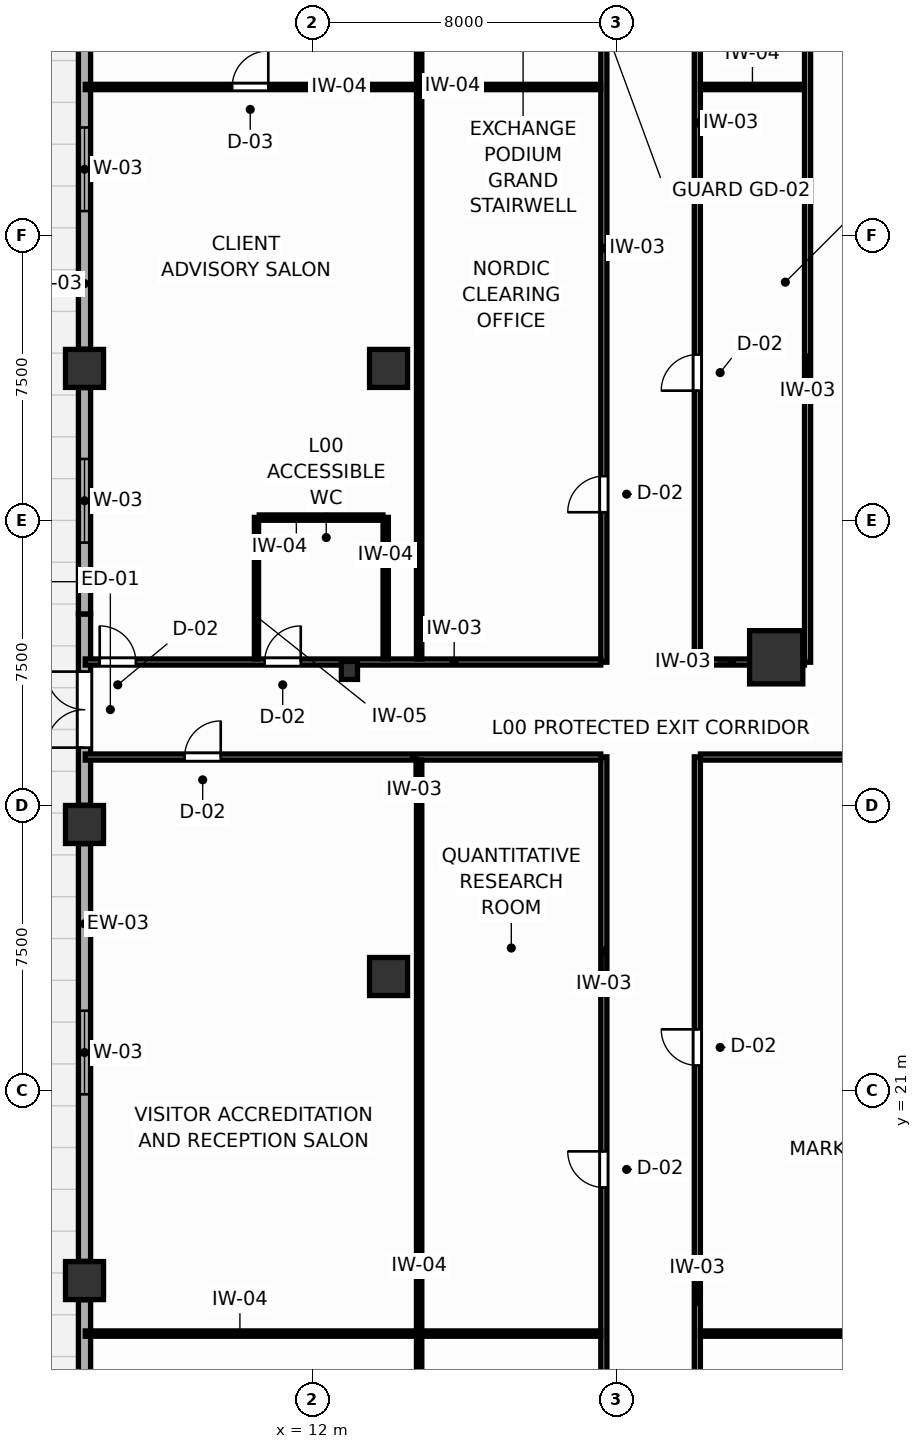
"""IFC4 building model, lengths in metres.
Left out: names, types, materials, properties, quantities, classifications, styles, units other than length and angle.
Written with IfcOpenShell. Run it as: python <this file> out.ifc"""

import sys

from ifc_helpers import new_model, si_unit, direction, frame, frame_2d, origin, origin_2d, place, context, subcontext, project, spatial, rectangle, i_section, extrude, source, transform, mapped, element, fill, save


model = new_model("IFC4")
c1 = context("Model", 3, precision=1e-05, world=origin(), true_north=direction((0.0, 1.0)))
c2 = subcontext(c1, "Body", "Model", "MODEL_VIEW")
j1 = project(units=[si_unit("LENGTHUNIT", "METRE"), si_unit("PLANEANGLEUNIT", "RADIAN")], contexts=[c1])
p1 = place(None, origin())
s1 = spatial("IfcSite", under=j1, at=p1, CompositionType="ELEMENT")
p2 = place(p1, origin())
s2 = spatial("IfcBuilding", under=s1, at=p2, CompositionType="ELEMENT")
p3 = place(p2, origin())
s3 = spatial("IfcBuildingStorey", under=s2, at=p3, CompositionType="ELEMENT", Elevation=0.0)
m1 = source(origin(), c2, "Body", "SweptSolid", [
    extrude(rectangle(XDim=1.4, YDim=1.4, at=origin_2d()), origin(), (0.0, 0.0, 1.0), 4.8),
])
p4 = place(p3, frame((24.2, 32.4, 0.0), z_axis=(0.0, 0.0, 1.0), x_axis=(1.0, 0.0, 0.0)))
e1 = element("IfcColumn", 1, at=p4, inside=s3, PredefinedType="COLUMN", context=c2, shape_type="MappedRepresentation", body=[
    mapped(m1, transform((0.0, 0.0, 0.0), scale=1.0)),
])
m2 = source(origin(), c2, "Body", "SweptSolid", [
    extrude(rectangle(XDim=1.0, YDim=1.0, at=origin_2d()), origin(), (0.0, 0.0, 1.0), 4.8),
])
for number, where, z_axis, x_axis in (
    (2, (6.0, 16.0, 0.0), (0.0, 0.0, 1.0), (1.0, 0.0, 0.0)),
    (3, (6.0, 28.0, 0.0), (0.0, 0.0, 1.0), (1.0, 0.0, 0.0)),
    (4, (6.0, 40.0, 0.0), (0.0, 0.0, 1.0), (1.0, 0.0, 0.0)),
    (5, (14.0, 24.0, 0.0), (0.0, 0.0, 1.0), (1.0, 0.0, 0.0)),
    (6, (14.0, 40.0, 0.0), (0.0, 0.0, 1.0), (1.0, 0.0, 0.0)),
):
    element("IfcColumn", number, at=place(p3, frame(where, z_axis=z_axis, x_axis=x_axis)), inside=s3, PredefinedType="COLUMN", context=c2, shape_type="MappedRepresentation", body=[
        mapped(m2, transform((0.0, 0.0, 0.0), scale=1.0)),
    ])
m3 = source(origin(), c2, "Body", "SweptSolid", [
    extrude(i_section(OverallWidth=0.424, OverallDepth=0.474, WebThickness=0.045, FlangeThickness=0.072, FilletRadius=0.015, at=origin_2d()), origin(), (0.0, 0.0, 1.0), 4.8),
])
p5 = place(p3, frame((12.97, 32.054, 0.0), z_axis=(0.0, 0.0, 1.0), x_axis=(1.0, 0.0, 0.0)))
e7 = element("IfcColumn", 7, at=p5, inside=s3, PredefinedType="COLUMN", context=c2, shape_type="MappedRepresentation", body=[
    mapped(m3, transform((0.0, 0.0, 0.0), scale=1.0)),
])
p6 = place(p3, frame((6.0, 4.505, 0.0), z_axis=(0.0, 0.0, 1.0), x_axis=(0.0, 1.0, 0.0)))
e8 = element("IfcWall", 8, at=p6, inside=s3, PredefinedType="SOLIDWALL", context=c2, shape_type="SweptSolid", body=[
    extrude(rectangle(XDim=10.99, YDim=0.32, at=frame_2d((5.495, 0.0))), origin(), (0.0, 0.0, 1.0), 3.82),
])
p7 = place(p6, frame((4.395, 0.0, 0.75)))
e9 = element("IfcOpeningElement", 9, at=p7, cuts=e8, PredefinedType="OPENING", context=c2, shape_type="SweptSolid", body=[
    extrude(rectangle(XDim=2.2, YDim=2.0, at=frame_2d((1.1, 1.0))), frame((0.0, 0.17, 0.0), z_axis=(0.0, -1.0, 0.0), x_axis=(1.0, 0.0, 0.0)), (0.0, 0.0, 1.0), 0.34),
])
p8 = place(p3, frame((6.0, 16.505, 0.0), z_axis=(0.0, 0.0, 1.0), x_axis=(0.0, 1.0, 0.0)))
e10 = element("IfcWall", 10, at=p8, inside=s3, PredefinedType="SOLIDWALL", context=c2, shape_type="SweptSolid", body=[
    extrude(rectangle(XDim=10.99, YDim=0.32, at=frame_2d((5.495, 0.0))), origin(), (0.0, 0.0, 1.0), 3.82),
])
p9 = place(p8, frame((4.395, 0.0, 0.75)))
e11 = element("IfcOpeningElement", 11, at=p9, cuts=e10, PredefinedType="OPENING", context=c2, shape_type="SweptSolid", body=[
    extrude(rectangle(XDim=2.2, YDim=2.0, at=frame_2d((1.1, 1.0))), frame((0.0, 0.17, 0.0), z_axis=(0.0, -1.0, 0.0), x_axis=(1.0, 0.0, 0.0)), (0.0, 0.0, 1.0), 0.34),
])
p10 = place(p3, frame((6.0, 28.505, 0.0), z_axis=(0.0, 0.0, 1.0), x_axis=(0.0, 1.0, 0.0)))
e12 = element("IfcWall", 12, at=p10, inside=s3, PredefinedType="SOLIDWALL", context=c2, shape_type="SweptSolid", body=[
    extrude(rectangle(XDim=5.035, YDim=0.32, at=frame_2d((2.518, 0.0))), origin(), (0.0, 0.0, 1.0), 3.82),
])
p11 = place(p10, frame((1.518, 0.0, 0.0)))
e13 = element("IfcOpeningElement", 13, at=p11, cuts=e12, PredefinedType="OPENING", context=c2, shape_type="SweptSolid", body=[
    extrude(rectangle(XDim=2.0, YDim=2.25, at=frame_2d((1.0, 1.125))), frame((0.0, 0.17, 0.0), z_axis=(0.0, -1.0, 0.0), x_axis=(1.0, 0.0, 0.0)), (0.0, 0.0, 1.0), 0.34),
])
p12 = place(p3, frame((6.0, 33.54, 0.0), z_axis=(0.0, 0.0, 1.0), x_axis=(0.0, 1.0, 0.0)))
e14 = element("IfcWall", 14, at=p12, inside=s3, PredefinedType="SOLIDWALL", context=c2, shape_type="SweptSolid", body=[
    extrude(rectangle(XDim=5.955, YDim=0.32, at=frame_2d((2.978, 0.0))), origin(), (0.0, 0.0, 1.0), 3.82),
])
p13 = place(p12, frame((1.877, 0.0, 0.75)))
e15 = element("IfcOpeningElement", 15, at=p13, cuts=e14, PredefinedType="OPENING", context=c2, shape_type="SweptSolid", body=[
    extrude(rectangle(XDim=2.2, YDim=2.0, at=frame_2d((1.1, 1.0))), frame((0.0, 0.17, 0.0), z_axis=(0.0, -1.0, 0.0), x_axis=(1.0, 0.0, 0.0)), (0.0, 0.0, 1.0), 0.34),
])
p14 = place(p3, frame((6.0, 40.505, 0.0), z_axis=(0.0, 0.0, 1.0), x_axis=(0.0, 1.0, 0.0)))
e16 = element("IfcWall", 16, at=p14, inside=s3, PredefinedType="SOLIDWALL", context=c2, shape_type="SweptSolid", body=[
    extrude(rectangle(XDim=9.47, YDim=0.32, at=frame_2d((4.735, 0.0))), origin(), (0.0, 0.0, 1.0), 3.82),
])
p15 = place(p14, frame((3.635, 0.0, 0.75)))
e17 = element("IfcOpeningElement", 17, at=p15, cuts=e16, PredefinedType="OPENING", context=c2, shape_type="SweptSolid", body=[
    extrude(rectangle(XDim=2.2, YDim=2.0, at=frame_2d((1.1, 1.0))), frame((0.0, 0.17, 0.0), z_axis=(0.0, -1.0, 0.0), x_axis=(1.0, 0.0, 0.0)), (0.0, 0.0, 1.0), 0.34),
])
p16 = place(p3, frame((22.125, 3.02, 0.0), z_axis=(0.0, 0.0, 1.0), x_axis=(0.0, 1.0, 0.0)))
e18 = element("IfcWall", 18, at=p16, inside=s3, PredefinedType="PARTITIONING", context=c2, shape_type="SweptSolid", body=[
    extrude(rectangle(XDim=26.76, YDim=0.16, at=frame_2d((13.38, 0.0))), origin(), (0.0, 0.0, 1.0), 4.52),
])
p17 = place(p16, frame((5.263, 0.0, 0.0)))
e19 = element("IfcOpeningElement", 19, at=p17, cuts=e18, PredefinedType="OPENING", context=c2, shape_type="SweptSolid", body=[
    extrude(rectangle(XDim=0.95, YDim=2.05, at=frame_2d((0.475, 1.025))), frame((0.0, 0.09, 0.0), z_axis=(0.0, -1.0, 0.0), x_axis=(1.0, 0.0, 0.0)), (0.0, 0.0, 1.0), 0.18),
])
p18 = place(p16, frame((18.64, 0.0, 0.0)))
e20 = element("IfcOpeningElement", 20, at=p18, cuts=e18, PredefinedType="OPENING", context=c2, shape_type="SweptSolid", body=[
    extrude(rectangle(XDim=0.95, YDim=2.05, at=frame_2d((0.475, 1.025))), frame((0.0, 0.09, 0.0), z_axis=(0.0, -1.0, 0.0), x_axis=(1.0, 0.0, 0.0)), (0.0, 0.0, 1.0), 0.18),
])
p19 = place(p3, frame((19.665, 3.02, 0.0), z_axis=(0.0, 0.0, 1.0), x_axis=(0.0, 1.0, 0.0)))
e21 = element("IfcWall", 21, at=p19, inside=s3, PredefinedType="PARTITIONING", context=c2, shape_type="SweptSolid", body=[
    extrude(rectangle(XDim=26.76, YDim=0.16, at=frame_2d((13.38, 0.0))), origin(), (0.0, 0.0, 1.0), 4.52),
])
p20 = place(p19, frame((8.486, 0.0, 0.0)))
e22 = element("IfcOpeningElement", 22, at=p20, cuts=e21, PredefinedType="OPENING", context=c2, shape_type="SweptSolid", body=[
    extrude(rectangle(XDim=0.95, YDim=2.05, at=frame_2d((0.475, 1.025))), frame((0.0, 0.09, 0.0), z_axis=(0.0, -1.0, 0.0), x_axis=(1.0, 0.0, 0.0)), (0.0, 0.0, 1.0), 0.18),
])
p21 = place(p19, frame((15.429, 0.0, 0.0)))
e23 = element("IfcOpeningElement", 23, at=p21, cuts=e21, PredefinedType="OPENING", context=c2, shape_type="SweptSolid", body=[
    extrude(rectangle(XDim=0.95, YDim=2.05, at=frame_2d((0.475, 1.025))), frame((0.0, 0.09, 0.0), z_axis=(0.0, -1.0, 0.0), x_axis=(1.0, 0.0, 0.0)), (0.0, 0.0, 1.0), 0.18),
])
p22 = place(p3, frame((22.125, 32.27, 0.0), z_axis=(0.0, 0.0, 1.0), x_axis=(0.0, 1.0, 0.0)))
e24 = element("IfcWall", 24, at=p22, inside=s3, PredefinedType="PARTITIONING", context=c2, shape_type="SweptSolid", body=[
    extrude(rectangle(XDim=26.71, YDim=0.16, at=frame_2d((13.355, 0.0))), origin(), (0.0, 0.0, 1.0), 4.52),
])
p23 = place(p22, frame((7.145, 0.0, 0.0)))
e25 = element("IfcOpeningElement", 25, at=p23, cuts=e24, PredefinedType="OPENING", context=c2, shape_type="SweptSolid", body=[
    extrude(rectangle(XDim=0.95, YDim=2.05, at=frame_2d((0.475, 1.025))), frame((0.0, 0.09, 0.0), z_axis=(0.0, -1.0, 0.0), x_axis=(1.0, 0.0, 0.0)), (0.0, 0.0, 1.0), 0.18),
])
p24 = place(p22, frame((20.283, 0.0, 0.0)))
e26 = element("IfcOpeningElement", 26, at=p24, cuts=e24, PredefinedType="OPENING", context=c2, shape_type="SweptSolid", body=[
    extrude(rectangle(XDim=0.95, YDim=2.05, at=frame_2d((0.475, 1.025))), frame((0.0, 0.09, 0.0), z_axis=(0.0, -1.0, 0.0), x_axis=(1.0, 0.0, 0.0)), (0.0, 0.0, 1.0), 0.18),
])
p25 = place(p3, frame((25.025, 32.27, 0.0), z_axis=(0.0, 0.0, 1.0), x_axis=(0.0, 1.0, 0.0)))
e27 = element("IfcWall", 27, at=p25, inside=s3, PredefinedType="PARTITIONING", context=c2, shape_type="SweptSolid", body=[
    extrude(rectangle(XDim=26.71, YDim=0.16, at=frame_2d((13.355, 0.0))), origin(), (0.0, 0.0, 1.0), 4.52),
])
p26 = place(p3, frame((19.665, 32.27, 0.0), z_axis=(0.0, 0.0, 1.0), x_axis=(0.0, 1.0, 0.0)))
e28 = element("IfcWall", 28, at=p26, inside=s3, PredefinedType="PARTITIONING", context=c2, shape_type="SweptSolid", body=[
    extrude(rectangle(XDim=16.71, YDim=0.16, at=frame_2d((8.355, 0.0))), origin(), (0.0, 0.0, 1.0), 4.52),
])
p27 = place(p26, frame((3.946, 0.0, 0.0)))
e29 = element("IfcOpeningElement", 29, at=p27, cuts=e28, PredefinedType="OPENING", context=c2, shape_type="SweptSolid", body=[
    extrude(rectangle(XDim=0.95, YDim=2.05, at=frame_2d((0.475, 1.025))), frame((0.0, 0.09, 0.0), z_axis=(0.0, -1.0, 0.0), x_axis=(1.0, 0.0, 0.0)), (0.0, 0.0, 1.0), 0.18),
])
p28 = place(p3, frame((6.02, 32.275, 0.0), z_axis=(0.0, 0.0, 1.0), x_axis=(1.0, 0.0, 0.0)))
e30 = element("IfcWall", 30, at=p28, inside=s3, PredefinedType="PARTITIONING", context=c2, shape_type="SweptSolid", body=[
    extrude(rectangle(XDim=13.563, YDim=0.16, at=frame_2d((6.781, 0.0))), origin(), (0.0, 0.0, 1.0), 3.82),
])
p29 = place(p28, frame((4.72, 0.0, 0.0)))
e31 = element("IfcOpeningElement", 31, at=p29, cuts=e30, PredefinedType="OPENING", context=c2, shape_type="SweptSolid", body=[
    extrude(rectangle(XDim=0.95, YDim=2.05, at=frame_2d((0.475, 1.025))), frame((0.0, 0.09, 0.0), z_axis=(0.0, -1.0, 0.0), x_axis=(1.0, 0.0, 0.0)), (0.0, 0.0, 1.0), 0.18),
])
p30 = place(p28, frame((0.38, 0.0, 0.0)))
e32 = element("IfcOpeningElement", 32, at=p30, cuts=e30, PredefinedType="OPENING", context=c2, shape_type="SweptSolid", body=[
    extrude(rectangle(XDim=0.95, YDim=2.05, at=frame_2d((0.475, 1.025))), frame((0.0, 0.09, 0.0), z_axis=(0.0, -1.0, 0.0), x_axis=(1.0, 0.0, 0.0)), (0.0, 0.0, 1.0), 0.18),
])
p31 = place(p3, frame((6.02, 29.775, 0.0), z_axis=(0.0, 0.0, 1.0), x_axis=(1.0, 0.0, 0.0)))
e33 = element("IfcWall", 33, at=p31, inside=s3, PredefinedType="PARTITIONING", context=c2, shape_type="SweptSolid", body=[
    extrude(rectangle(XDim=13.563, YDim=0.16, at=frame_2d((6.781, 0.0))), origin(), (0.0, 0.0, 1.0), 4.52),
])
p32 = place(p31, frame((2.614, 0.0, 0.0)))
e34 = element("IfcOpeningElement", 34, at=p32, cuts=e33, PredefinedType="OPENING", context=c2, shape_type="SweptSolid", body=[
    extrude(rectangle(XDim=0.95, YDim=2.05, at=frame_2d((0.475, 1.025))), frame((0.0, 0.09, 0.0), z_axis=(0.0, -1.0, 0.0), x_axis=(1.0, 0.0, 0.0)), (0.0, 0.0, 1.0), 0.18),
])
p33 = place(p3, frame((22.207, 29.775, 0.0), z_axis=(0.0, 0.0, 1.0), x_axis=(1.0, 0.0, 0.0)))
e35 = element("IfcWall", 35, at=p33, inside=s3, PredefinedType="PARTITIONING", context=c2, shape_type="SweptSolid", body=[
    extrude(rectangle(XDim=12.436, YDim=0.16, at=frame_2d((6.218, 0.0))), origin(), (0.0, 0.0, 1.0), 4.52),
])
p34 = place(p3, frame((22.207, 32.275, 0.0), z_axis=(0.0, 0.0, 1.0), x_axis=(1.0, 0.0, 0.0)))
e36 = element("IfcWall", 36, at=p34, inside=s3, PredefinedType="PARTITIONING", context=c2, shape_type="SweptSolid", body=[
    extrude(rectangle(XDim=2.736, YDim=0.16, at=frame_2d((1.368, 0.0))), origin(), (0.0, 0.0, 1.0), 3.82),
])
p35 = place(p3, frame((14.805, 3.02, 0.0), z_axis=(0.0, 0.0, 1.0), x_axis=(0.0, 1.0, 0.0)))
e37 = element("IfcWall", 37, at=p35, inside=s3, PredefinedType="PARTITIONING", context=c2, shape_type="SweptSolid", body=[
    extrude(rectangle(XDim=26.673, YDim=0.14, at=frame_2d((13.336, 0.0))), origin(), (0.0, 0.0, 1.0), 4.52),
])
p36 = place(p35, frame((5.263, 0.0, 0.0)))
e38 = element("IfcOpeningElement", 38, at=p36, cuts=e37, PredefinedType="OPENING", context=c2, shape_type="SweptSolid", body=[
    extrude(rectangle(XDim=0.95, YDim=2.05, at=frame_2d((0.475, 1.025))), frame((0.0, 0.08, 0.0), z_axis=(0.0, -1.0, 0.0), x_axis=(1.0, 0.0, 0.0)), (0.0, 0.0, 1.0), 0.16),
])
p37 = place(p3, frame((14.805, 32.357, 0.0), z_axis=(0.0, 0.0, 1.0), x_axis=(0.0, 1.0, 0.0)))
e39 = element("IfcWall", 39, at=p37, inside=s3, PredefinedType="PARTITIONING", context=c2, shape_type="SweptSolid", body=[
    extrude(rectangle(XDim=26.623, YDim=0.14, at=frame_2d((13.312, 0.0))), origin(), (0.0, 0.0, 1.0), 4.52),
])
p38 = place(p37, frame((21.7, 0.0, 0.0)))
e40 = element("IfcOpeningElement", 40, at=p38, cuts=e39, PredefinedType="OPENING", context=c2, shape_type="SweptSolid", body=[
    extrude(rectangle(XDim=0.95, YDim=2.05, at=frame_2d((0.475, 1.025))), frame((0.0, 0.08, 0.0), z_axis=(0.0, -1.0, 0.0), x_axis=(1.0, 0.0, 0.0)), (0.0, 0.0, 1.0), 0.16),
])
p39 = place(p3, frame((6.02, 14.605, 0.0), z_axis=(0.0, 0.0, 1.0), x_axis=(1.0, 0.0, 0.0)))
e41 = element("IfcWall", 41, at=p39, inside=s3, PredefinedType="PARTITIONING", context=c2, shape_type="SweptSolid", body=[
    extrude(rectangle(XDim=13.563, YDim=0.14, at=frame_2d((6.781, 0.0))), origin(), (0.0, 0.0, 1.0), 4.52),
])
p40 = place(p3, frame((6.02, 47.405, 0.0), z_axis=(0.0, 0.0, 1.0), x_axis=(1.0, 0.0, 0.0)))
e42 = element("IfcWall", 42, at=p40, inside=s3, PredefinedType="PARTITIONING", context=c2, shape_type="SweptSolid", body=[
    extrude(rectangle(XDim=13.563, YDim=0.14, at=frame_2d((6.781, 0.0))), origin(), (0.0, 0.0, 1.0), 4.52),
])
p41 = place(p40, frame((3.866, 0.0, 0.0)))
e43 = element("IfcOpeningElement", 43, at=p41, cuts=e42, PredefinedType="OPENING", context=c2, shape_type="SweptSolid", body=[
    extrude(rectangle(XDim=0.95, YDim=2.05, at=frame_2d((0.475, 1.025))), frame((0.0, 0.08, 0.0), z_axis=(0.0, -1.0, 0.0), x_axis=(1.0, 0.0, 0.0)), (0.0, 0.0, 1.0), 0.16),
])
p42 = place(p3, frame((22.207, 14.605, 0.0), z_axis=(0.0, 0.0, 1.0), x_axis=(1.0, 0.0, 0.0)))
e44 = element("IfcWall", 44, at=p42, inside=s3, PredefinedType="PARTITIONING", context=c2, shape_type="SweptSolid", body=[
    extrude(rectangle(XDim=12.436, YDim=0.14, at=frame_2d((6.218, 0.0))), origin(), (0.0, 0.0, 1.0), 4.52),
])
p43 = place(p3, frame((10.525, 32.357, 0.0), z_axis=(0.0, 0.0, 1.0), x_axis=(0.0, 1.0, 0.0)))
e45 = element("IfcWall", 45, at=p43, inside=s3, PredefinedType="MOVABLE", context=c2, shape_type="SweptSolid", body=[
    extrude(rectangle(XDim=3.723, YDim=0.11, at=frame_2d((1.862, 0.0))), origin(), (0.0, 0.0, 1.0), 4.52),
])
p44 = place(p3, frame((13.925, 32.357, 0.0), z_axis=(0.0, 0.0, 1.0), x_axis=(0.0, 1.0, 0.0)))
e46 = element("IfcWall", 46, at=p44, inside=s3, PredefinedType="PARTITIONING", context=c2, shape_type="SweptSolid", body=[
    extrude(rectangle(XDim=3.723, YDim=0.14, at=frame_2d((1.862, 0.0))), origin(), (0.0, 0.0, 1.0), 3.82),
])
p45 = place(p3, frame((10.597, 36.075, 0.0), z_axis=(0.0, 0.0, 1.0), x_axis=(1.0, 0.0, 0.0)))
e47 = element("IfcWall", 47, at=p45, inside=s3, PredefinedType="PARTITIONING", context=c2, shape_type="SweptSolid", body=[
    extrude(rectangle(XDim=3.256, YDim=0.14, at=frame_2d((1.628, 0.0))), origin(), (0.0, 0.0, 1.0), 4.52),
])
p46 = place(p3, frame((22.207, 47.405, 0.0), z_axis=(0.0, 0.0, 1.0), x_axis=(1.0, 0.0, 0.0)))
e48 = element("IfcWall", 48, at=p46, inside=s3, PredefinedType="PARTITIONING", context=c2, shape_type="SweptSolid", body=[
    extrude(rectangle(XDim=2.736, YDim=0.14, at=frame_2d((1.368, 0.0))), origin(), (0.0, 0.0, 1.0), 4.52),
])
p47 = place(p9, origin())
e49 = element("IfcWindow", 49, at=p47, inside=s3, PartitioningType="SINGLE_PANEL", PredefinedType="WINDOW", context=c2, shape_type="SweptSolid", body=[
    extrude(rectangle(XDim=2.2, YDim=2.0, at=frame_2d((1.1, 1.0))), frame((0.0, 0.03, 0.0), z_axis=(0.0, -1.0, 0.0), x_axis=(1.0, 0.0, 0.0)), (0.0, 0.0, 1.0), 0.06),
])
fill(e11, e49)
p48 = place(p11, origin())
e50 = element("IfcDoor", 50, at=p48, inside=s3, OperationType="DOUBLE_DOOR_SINGLE_SWING", PredefinedType="DOOR", context=c2, shape_type="SweptSolid", body=[
    extrude(rectangle(XDim=2.0, YDim=2.25, at=frame_2d((1.0, 1.125))), frame((0.0, 0.025, 0.0), z_axis=(0.0, -1.0, 0.0), x_axis=(1.0, 0.0, 0.0)), (0.0, 0.0, 1.0), 0.05),
])
fill(e13, e50)
p49 = place(p13, origin())
e51 = element("IfcWindow", 51, at=p49, inside=s3, PartitioningType="SINGLE_PANEL", PredefinedType="WINDOW", context=c2, shape_type="SweptSolid", body=[
    extrude(rectangle(XDim=2.2, YDim=2.0, at=frame_2d((1.1, 1.0))), frame((0.0, 0.03, 0.0), z_axis=(0.0, -1.0, 0.0), x_axis=(1.0, 0.0, 0.0)), (0.0, 0.0, 1.0), 0.06),
])
fill(e15, e51)
p50 = place(p15, origin())
e52 = element("IfcWindow", 52, at=p50, inside=s3, PartitioningType="SINGLE_PANEL", PredefinedType="WINDOW", context=c2, shape_type="SweptSolid", body=[
    extrude(rectangle(XDim=2.2, YDim=2.0, at=frame_2d((1.1, 1.0))), frame((0.0, 0.03, 0.0), z_axis=(0.0, -1.0, 0.0), x_axis=(1.0, 0.0, 0.0)), (0.0, 0.0, 1.0), 0.06),
])
fill(e17, e52)
p51 = place(p18, origin())
e53 = element("IfcDoor", 53, at=p51, inside=s3, OperationType="SINGLE_SWING_RIGHT", PredefinedType="DOOR", context=c2, shape_type="SweptSolid", body=[
    extrude(rectangle(XDim=0.95, YDim=2.05, at=frame_2d((0.475, 1.025))), frame((0.0, 0.025, 0.0), z_axis=(0.0, -1.0, 0.0), x_axis=(1.0, 0.0, 0.0)), (0.0, 0.0, 1.0), 0.05),
])
fill(e20, e53)
p52 = place(p21, origin())
e54 = element("IfcDoor", 54, at=p52, inside=s3, OperationType="SINGLE_SWING_RIGHT", PredefinedType="DOOR", context=c2, shape_type="SweptSolid", body=[
    extrude(rectangle(XDim=0.95, YDim=2.05, at=frame_2d((0.475, 1.025))), frame((0.0, 0.025, 0.0), z_axis=(0.0, -1.0, 0.0), x_axis=(1.0, 0.0, 0.0)), (0.0, 0.0, 1.0), 0.05),
])
fill(e23, e54)
p53 = place(p23, origin())
e55 = element("IfcDoor", 55, at=p53, inside=s3, OperationType="SINGLE_SWING_LEFT", PredefinedType="DOOR", context=c2, shape_type="SweptSolid", body=[
    extrude(rectangle(XDim=0.95, YDim=2.05, at=frame_2d((0.475, 1.025))), frame((0.0, 0.025, 0.0), z_axis=(0.0, -1.0, 0.0), x_axis=(1.0, 0.0, 0.0)), (0.0, 0.0, 1.0), 0.05),
])
fill(e25, e55)
p54 = place(p27, origin())
e56 = element("IfcDoor", 56, at=p54, inside=s3, OperationType="SINGLE_SWING_LEFT", PredefinedType="DOOR", context=c2, shape_type="SweptSolid", body=[
    extrude(rectangle(XDim=0.95, YDim=2.05, at=frame_2d((0.475, 1.025))), frame((0.0, 0.025, 0.0), z_axis=(0.0, -1.0, 0.0), x_axis=(1.0, 0.0, 0.0)), (0.0, 0.0, 1.0), 0.05),
])
fill(e29, e56)
p55 = place(p29, origin())
e57 = element("IfcDoor", 57, at=p55, inside=s3, OperationType="SINGLE_SWING_RIGHT", PredefinedType="DOOR", context=c2, shape_type="SweptSolid", body=[
    extrude(rectangle(XDim=0.95, YDim=2.05, at=frame_2d((0.475, 1.025))), frame((0.0, 0.025, 0.0), z_axis=(0.0, -1.0, 0.0), x_axis=(1.0, 0.0, 0.0)), (0.0, 0.0, 1.0), 0.05),
])
fill(e31, e57)
p56 = place(p30, origin())
e58 = element("IfcDoor", 58, at=p56, inside=s3, OperationType="SINGLE_SWING_LEFT", PredefinedType="DOOR", context=c2, shape_type="SweptSolid", body=[
    extrude(rectangle(XDim=0.95, YDim=2.05, at=frame_2d((0.475, 1.025))), frame((0.0, 0.025, 0.0), z_axis=(0.0, -1.0, 0.0), x_axis=(1.0, 0.0, 0.0)), (0.0, 0.0, 1.0), 0.05),
])
fill(e32, e58)
p57 = place(p32, origin())
e59 = element("IfcDoor", 59, at=p57, inside=s3, OperationType="SINGLE_SWING_RIGHT", PredefinedType="DOOR", context=c2, shape_type="SweptSolid", body=[
    extrude(rectangle(XDim=0.95, YDim=2.05, at=frame_2d((0.475, 1.025))), frame((0.0, 0.025, 0.0), z_axis=(0.0, -1.0, 0.0), x_axis=(1.0, 0.0, 0.0)), (0.0, 0.0, 1.0), 0.05),
])
fill(e34, e59)
p58 = place(p41, origin())
e60 = element("IfcDoor", 60, at=p58, inside=s3, OperationType="SINGLE_SWING_RIGHT", PredefinedType="DOOR", context=c2, shape_type="SweptSolid", body=[
    extrude(rectangle(XDim=0.95, YDim=2.05, at=frame_2d((0.475, 1.025))), frame((0.0, 0.025, 0.0), z_axis=(0.0, -1.0, 0.0), x_axis=(1.0, 0.0, 0.0)), (0.0, 0.0, 1.0), 0.05),
])
fill(e43, e60)
save(model, sys.argv[1])
